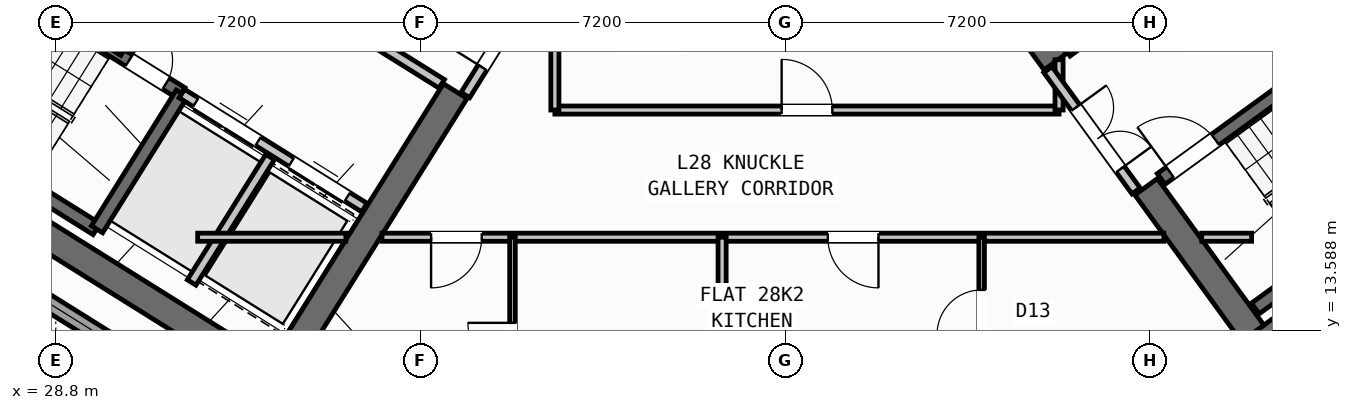
"""IFC4 building model, lengths in metres.
Left out: names, types, materials, properties, quantities, classifications, styles, units other than length and angle.
Written with IfcOpenShell. Run it as: python <this file> out.ifc"""

import sys

from ifc_helpers import new_model, si_unit, direction, frame, frame_2d, origin, place, context, subcontext, project, spatial, rectangle, extrude, source, transform, mapped, element, fill, save


model = new_model("IFC4")
c1 = context("Model", 3, precision=1e-05, world=origin(), true_north=direction((0.0, 1.0)))
c2 = subcontext(c1, "Body", "Model", "MODEL_VIEW")
j1 = project(units=[si_unit("LENGTHUNIT", "METRE"), si_unit("PLANEANGLEUNIT", "RADIAN")], contexts=[c1])
p1 = place(None, origin())
s1 = spatial("IfcSite", under=j1, at=p1, CompositionType="ELEMENT")
p2 = place(p1, origin())
s2 = spatial("IfcBuilding", under=s1, at=p2, CompositionType="ELEMENT")
p3 = place(p2, frame((0.0, 0.0, 112.5)))
s3 = spatial("IfcBuildingStorey", under=s2, at=p3, CompositionType="ELEMENT", Elevation=112.5)
p4 = place(p3, frame((33.366, 12.477, 0.0), z_axis=(0.0, 0.0, 1.0), x_axis=(-0.848047359947, 0.529920442413, 0.0)))
e1 = element("IfcWall", 1, at=p4, inside=s3, PredefinedType="SHEAR", context=c2, shape_type="SweptSolid", body=[
    extrude(rectangle(XDim=13.14, YDim=0.55, at=frame_2d((6.57, 0.0))), origin(), (0.0, 0.0, 1.0), 3.35),
])
p5 = place(p3, frame((36.683, 18.304, 0.0), z_axis=(0.0, 0.0, 1.0), x_axis=(-0.529896466841, -0.848062341122, 0.0)))
e2 = element("IfcWall", 2, at=p5, inside=s3, PredefinedType="SHEAR", context=c2, shape_type="SweptSolid", body=[
    extrude(rectangle(XDim=6.425, YDim=0.55, at=frame_2d((3.212, 0.0))), origin(), (0.0, 0.0, 1.0), 3.35),
])
p6 = place(p3, frame((52.359, 13.14, 0.0), z_axis=(0.0, 0.0, 1.0), x_axis=(0.809014896919, 0.587788139183, 0.0)))
e3 = element("IfcWall", 3, at=p6, inside=s3, PredefinedType="SHEAR", context=c2, shape_type="SweptSolid", body=[
    extrude(rectangle(XDim=12.34, YDim=0.55, at=frame_2d((6.17, 0.0))), origin(), (0.0, 0.0, 1.0), 3.35),
])
p7 = place(p3, frame((52.42, 13.524, 0.0), z_axis=(0.0, 0.0, 1.0), x_axis=(-0.587802113096, 0.809004744015, 0.0)))
e4 = element("IfcWall", 4, at=p7, inside=s3, PredefinedType="SHEAR", context=c2, shape_type="SweptSolid", body=[
    extrude(rectangle(XDim=3.575, YDim=0.55, at=frame_2d((1.788, 0.0))), origin(), (0.0, 0.0, 1.0), 3.35),
])
p8 = place(p3, frame((48.526, 18.884, 0.0), z_axis=(0.0, 0.0, 1.0), x_axis=(-0.587764933797, 0.809031756236, 0.0)))
e5 = element("IfcWall", 5, at=p8, inside=s3, PredefinedType="SHEAR", context=c2, shape_type="SweptSolid", body=[
    extrude(rectangle(XDim=6.425, YDim=0.55, at=frame_2d((3.212, 0.0))), origin(), (0.0, 0.0, 1.0), 3.35),
])
p9 = place(p3, frame((31.76, 12.183, 0.0), z_axis=(0.0, 0.0, 1.0), x_axis=(-0.848047074256, 0.529920899612, 0.0)))
e6 = element("IfcWall", 6, at=p9, inside=s3, PredefinedType="STANDARD", context=c2, shape_type="SweptSolid", body=[
    extrude(rectangle(XDim=30.652, YDim=0.32, at=frame_2d((15.326, 0.0))), origin(), (0.0, 0.0, 1.0), 3.35),
])
p10 = place(p9, frame((15.153, 0.0, 0.0)))
e7 = element("IfcOpeningElement", 7, at=p10, cuts=e6, PredefinedType="OPENING", context=c2, shape_type="SweptSolid", body=[
    extrude(rectangle(XDim=1.2, YDim=2.15, at=frame_2d((0.6, 1.075))), frame((0.0, 0.17, 0.0), z_axis=(0.0, -1.0, 0.0), x_axis=(1.0, 0.0, 0.0)), (0.0, 0.0, 1.0), 0.34),
])
p11 = place(p9, frame((2.002, 0.0, 0.8)))
e8 = element("IfcOpeningElement", 8, at=p11, cuts=e6, PredefinedType="OPENING", context=c2, shape_type="SweptSolid", body=[
    extrude(rectangle(XDim=2.1, YDim=1.55, at=frame_2d((1.05, 0.775))), frame((0.0, 0.17, 0.0), z_axis=(0.0, -1.0, 0.0), x_axis=(1.0, 0.0, 0.0)), (0.0, 0.0, 1.0), 0.34),
])
p12 = place(p9, frame((7.206, 0.0, 0.8)))
e9 = element("IfcOpeningElement", 9, at=p12, cuts=e6, PredefinedType="OPENING", context=c2, shape_type="SweptSolid", body=[
    extrude(rectangle(XDim=2.1, YDim=1.55, at=frame_2d((1.05, 0.775))), frame((0.0, 0.17, 0.0), z_axis=(0.0, -1.0, 0.0), x_axis=(1.0, 0.0, 0.0)), (0.0, 0.0, 1.0), 0.34),
])
p13 = place(p9, frame((12.648, 0.0, 1.0)))
e10 = element("IfcOpeningElement", 10, at=p13, cuts=e6, PredefinedType="OPENING", context=c2, shape_type="SweptSolid", body=[
    extrude(rectangle(XDim=0.9, YDim=1.25, at=frame_2d((0.45, 0.625))), frame((0.0, 0.17, 0.0), z_axis=(0.0, -1.0, 0.0), x_axis=(1.0, 0.0, 0.0)), (0.0, 0.0, 1.0), 0.34),
])
p14 = place(p9, frame((19.59, 0.0, 0.95)))
e11 = element("IfcOpeningElement", 11, at=p14, cuts=e6, PredefinedType="OPENING", context=c2, shape_type="SweptSolid", body=[
    extrude(rectangle(XDim=1.2, YDim=1.4, at=frame_2d((0.6, 0.7))), frame((0.0, 0.17, 0.0), z_axis=(0.0, -1.0, 0.0), x_axis=(1.0, 0.0, 0.0)), (0.0, 0.0, 1.0), 0.34),
])
p15 = place(p9, frame((25.966, 0.0, 1.0)))
e12 = element("IfcOpeningElement", 12, at=p15, cuts=e6, PredefinedType="OPENING", context=c2, shape_type="SweptSolid", body=[
    extrude(rectangle(XDim=0.9, YDim=1.25, at=frame_2d((0.45, 0.625))), frame((0.0, 0.17, 0.0), z_axis=(0.0, -1.0, 0.0), x_axis=(1.0, 0.0, 0.0)), (0.0, 0.0, 1.0), 0.34),
])
p16 = place(p9, frame((28.871, 0.0, 1.0)))
e13 = element("IfcOpeningElement", 13, at=p16, cuts=e6, PredefinedType="OPENING", context=c2, shape_type="SweptSolid", body=[
    extrude(rectangle(XDim=0.9, YDim=1.25, at=frame_2d((0.45, 0.625))), frame((0.0, 0.17, 0.0), z_axis=(0.0, -1.0, 0.0), x_axis=(1.0, 0.0, 0.0)), (0.0, 0.0, 1.0), 0.34),
])
p17 = place(p3, frame((29.605, 15.581, 0.0), z_axis=(0.0, 0.0, 1.0), x_axis=(-0.848036911448, 0.529937163087, 0.0)))
e14 = element("IfcWall", 14, at=p17, inside=s3, PredefinedType="SHEAR", context=c2, shape_type="SweptSolid", body=[
    extrude(rectangle(XDim=7.46, YDim=0.26, at=frame_2d((3.73, 0.0))), origin(), (0.0, 0.0, 1.0), 3.35),
])
p18 = place(p3, frame((31.28, 18.261, 0.0), z_axis=(0.0, 0.0, 1.0), x_axis=(-0.848051618787, 0.529913626805, 0.0)))
e15 = element("IfcWall", 15, at=p18, inside=s3, PredefinedType="SHEAR", context=c2, shape_type="SweptSolid", body=[
    extrude(rectangle(XDim=7.46, YDim=0.26, at=frame_2d((3.73, 0.0))), origin(), (0.0, 0.0, 1.0), 3.35),
])
p19 = place(p18, frame((0.36, 0.0, 0.0)))
e16 = element("IfcOpeningElement", 16, at=p19, cuts=e15, PredefinedType="OPENING", context=c2, shape_type="SweptSolid", body=[
    extrude(rectangle(XDim=0.86, YDim=2.05, at=frame_2d((0.43, 1.025))), frame((0.0, 0.14, 0.0), z_axis=(0.0, -1.0, 0.0), x_axis=(1.0, 0.0, 0.0)), (0.0, 0.0, 1.0), 0.28),
])
p20 = place(p3, frame((31.288, 18.256, 0.0), z_axis=(0.0, 0.0, 1.0), x_axis=(-0.529943379326, -0.848033026897, 0.0)))
e17 = element("IfcWall", 17, at=p20, inside=s3, PredefinedType="SHEAR", context=c2, shape_type="SweptSolid", body=[
    extrude(rectangle(XDim=3.16, YDim=0.26, at=frame_2d((1.58, 0.0))), origin(), (0.0, 0.0, 1.0), 3.35),
])
p21 = place(p3, frame((34.891, 16.005, 0.0), z_axis=(0.0, 0.0, 1.0), x_axis=(-0.848062873452, 0.529895614884, 0.0)))
e18 = element("IfcWall", 18, at=p21, inside=s3, PredefinedType="STANDARD", context=c2, shape_type="SweptSolid", body=[
    extrude(rectangle(XDim=4.248, YDim=0.2, at=frame_2d((2.124, 0.0))), origin(), (0.0, 0.0, 1.0), 3.34),
])
p22 = place(p21, frame((0.398, 0.0, 0.0)))
e19 = element("IfcOpeningElement", 19, at=p22, cuts=e18, PredefinedType="OPENING", context=c2, shape_type="SweptSolid", body=[
    extrude(rectangle(XDim=1.3, YDim=2.2, at=frame_2d((0.65, 1.1))), frame((0.0, 0.11, 0.0), z_axis=(0.0, -1.0, 0.0), x_axis=(1.0, 0.0, 0.0)), (0.0, 0.0, 1.0), 0.22),
])
p23 = place(p21, frame((2.473, 0.0, 0.0)))
e20 = element("IfcOpeningElement", 20, at=p23, cuts=e18, PredefinedType="OPENING", context=c2, shape_type="SweptSolid", body=[
    extrude(rectangle(XDim=1.45, YDim=2.25, at=frame_2d((0.725, 1.125))), frame((0.0, 0.11, 0.0), z_axis=(0.0, -1.0, 0.0), x_axis=(1.0, 0.0, 0.0)), (0.0, 0.0, 1.0), 0.22),
])
p24 = place(p3, frame((36.417, 18.447, 0.0), z_axis=(0.0, 0.0, 1.0), x_axis=(-0.848064879198, 0.529892404805, 0.0)))
e21 = element("IfcWall", 21, at=p24, inside=s3, PredefinedType="STANDARD", context=c2, shape_type="SweptSolid", body=[
    extrude(rectangle(XDim=5.768, YDim=0.2, at=frame_2d((2.884, 0.0))), origin(), (0.0, 0.0, 1.0), 3.34),
])
p25 = place(p24, frame((2.548, 0.0, 0.0)))
e22 = element("IfcOpeningElement", 22, at=p25, cuts=e21, PredefinedType="OPENING", context=c2, shape_type="SweptSolid", body=[
    extrude(rectangle(XDim=1.15, YDim=2.1, at=frame_2d((0.575, 1.05))), frame((0.0, 0.11, 0.0), z_axis=(0.0, -1.0, 0.0), x_axis=(1.0, 0.0, 0.0)), (0.0, 0.0, 1.0), 0.22),
])
p26 = place(p3, frame((33.029, 17.003, 0.0), z_axis=(0.0, 0.0, 1.0), x_axis=(-0.529916267533, -0.848049968695, 0.0)))
e23 = element("IfcWall", 23, at=p26, inside=s3, PredefinedType="STANDARD", context=c2, shape_type="SweptSolid", body=[
    extrude(rectangle(XDim=2.92, YDim=0.2, at=frame_2d((1.46, 0.0))), origin(), (0.0, 0.0, 1.0), 3.34),
])
p27 = place(p3, frame((31.525, 21.504, 0.0), z_axis=(0.0, 0.0, 1.0), x_axis=(-0.529907497854, -0.848055448493, 0.0)))
e24 = element("IfcWall", 24, at=p27, inside=s3, PredefinedType="STANDARD", context=c2, shape_type="SweptSolid", body=[
    extrude(rectangle(XDim=2.88, YDim=0.2, at=frame_2d((1.44, 0.0))), origin(), (0.0, 0.0, 1.0), 3.34),
])
p28 = place(p3, frame((52.472, 14.013, 0.0), z_axis=(0.0, 0.0, 1.0), x_axis=(0.809028366311, 0.587769599847, 0.0)))
e25 = element("IfcWall", 25, at=p28, inside=s3, PredefinedType="SHEAR", context=c2, shape_type="SweptSolid", body=[
    extrude(rectangle(XDim=7.33, YDim=0.26, at=frame_2d((3.665, 0.0))), origin(), (0.0, 0.0, 1.0), 3.35),
])
p29 = place(p3, frame((50.615, 16.57, 0.0), z_axis=(0.0, 0.0, 1.0), x_axis=(0.809028366311, 0.587769599847, 0.0)))
e26 = element("IfcWall", 26, at=p29, inside=s3, PredefinedType="SHEAR", context=c2, shape_type="SweptSolid", body=[
    extrude(rectangle(XDim=7.33, YDim=0.26, at=frame_2d((3.665, 0.0))), origin(), (0.0, 0.0, 1.0), 3.35),
])
p30 = place(p29, frame((0.22, 0.0, 0.0)))
e27 = element("IfcOpeningElement", 27, at=p30, cuts=e26, PredefinedType="OPENING", context=c2, shape_type="SweptSolid", body=[
    extrude(rectangle(XDim=1.1, YDim=2.1, at=frame_2d((0.55, 1.05))), frame((0.0, 0.14, 0.0), z_axis=(0.0, -1.0, 0.0), x_axis=(1.0, 0.0, 0.0)), (0.0, 0.0, 1.0), 0.28),
])
p31 = place(p3, frame((48.758, 19.077, 0.0), z_axis=(0.0, 0.0, 1.0), x_axis=(0.809005065155, 0.587801671104, 0.0)))
e28 = element("IfcWall", 28, at=p31, inside=s3, PredefinedType="STANDARD", context=c2, shape_type="SweptSolid", body=[
    extrude(rectangle(XDim=5.768, YDim=0.2, at=frame_2d((2.884, 0.0))), origin(), (0.0, 0.0, 1.0), 3.34),
])
p32 = place(p31, frame((2.548, 0.0, 0.0)))
e29 = element("IfcOpeningElement", 29, at=p32, cuts=e28, PredefinedType="OPENING", context=c2, shape_type="SweptSolid", body=[
    extrude(rectangle(XDim=1.15, YDim=2.1, at=frame_2d((0.575, 1.05))), frame((0.0, 0.11, 0.0), z_axis=(0.0, -1.0, 0.0), x_axis=(1.0, 0.0, 0.0)), (0.0, 0.0, 1.0), 0.22),
])
p33 = place(p3, frame((38.451, 20.737, 0.0), z_axis=(0.0, 0.0, 1.0), x_axis=(-0.529924799939, -0.848044637038, 0.0)))
e30 = element("IfcWall", 30, at=p33, inside=s3, PredefinedType="STANDARD", context=c2, shape_type="SweptSolid", body=[
    extrude(rectangle(XDim=2.96, YDim=0.2, at=frame_2d((1.48, 0.0))), origin(), (0.0, 0.0, 1.0), 3.34),
])
p34 = place(p33, frame((1.46, 0.0, 0.0)))
e31 = element("IfcOpeningElement", 31, at=p34, cuts=e30, PredefinedType="OPENING", context=c2, shape_type="SweptSolid", body=[
    extrude(rectangle(XDim=0.86, YDim=2.05, at=frame_2d((0.43, 1.025))), frame((0.0, 0.11, 0.0), z_axis=(0.0, -1.0, 0.0), x_axis=(1.0, 0.0, 0.0)), (0.0, 0.0, 1.0), 0.22),
])
p35 = place(p3, frame((31.6, 15.42, 0.0), z_axis=(0.0, 0.0, 1.0), x_axis=(1.0, 0.0, 0.0)))
e32 = element("IfcWall", 32, at=p35, inside=s3, PredefinedType="PARTITIONING", context=c2, shape_type="SweptSolid", body=[
    extrude(rectangle(XDim=2.925, YDim=0.16, at=frame_2d((1.462, 0.0))), origin(), (0.0, 0.0, 1.0), 3.34),
])
p36 = place(p3, frame((35.237, 15.42, 0.0), z_axis=(0.0, 0.0, 1.0), x_axis=(1.0, 0.0, 0.0)))
e33 = element("IfcWall", 33, at=p36, inside=s3, PredefinedType="PARTITIONING", context=c2, shape_type="SweptSolid", body=[
    extrude(rectangle(XDim=15.432, YDim=0.16, at=frame_2d((7.716, 0.0))), origin(), (0.0, 0.0, 1.0), 3.34),
])
p37 = place(p36, frame((0.969, 0.0, 0.0)))
e34 = element("IfcOpeningElement", 34, at=p37, cuts=e33, PredefinedType="OPENING", context=c2, shape_type="SweptSolid", body=[
    extrude(rectangle(XDim=1.0, YDim=2.1, at=frame_2d((0.5, 1.05))), frame((0.0, 0.09, 0.0), z_axis=(0.0, -1.0, 0.0), x_axis=(1.0, 0.0, 0.0)), (0.0, 0.0, 1.0), 0.18),
])
p38 = place(p36, frame((8.799, 0.0, 0.0)))
e35 = element("IfcOpeningElement", 35, at=p38, cuts=e33, PredefinedType="OPENING", context=c2, shape_type="SweptSolid", body=[
    extrude(rectangle(XDim=1.0, YDim=2.1, at=frame_2d((0.5, 1.05))), frame((0.0, 0.09, 0.0), z_axis=(0.0, -1.0, 0.0), x_axis=(1.0, 0.0, 0.0)), (0.0, 0.0, 1.0), 0.18),
])
p39 = place(p3, frame((51.416, 15.42, 0.0), z_axis=(0.0, 0.0, 1.0), x_axis=(1.0, 0.0, 0.0)))
e36 = element("IfcWall", 36, at=p39, inside=s3, PredefinedType="PARTITIONING", context=c2, shape_type="SweptSolid", body=[
    extrude(rectangle(XDim=0.984, YDim=0.16, at=frame_2d((0.492, 0.0))), origin(), (0.0, 0.0, 1.0), 3.34),
])
p40 = place(p3, frame((38.65, 17.93, 0.0), z_axis=(0.0, 0.0, 1.0), x_axis=(1.0, 0.0, 0.0)))
e37 = element("IfcWall", 37, at=p40, inside=s3, PredefinedType="PARTITIONING", context=c2, shape_type="SweptSolid", body=[
    extrude(rectangle(XDim=9.95, YDim=0.16, at=frame_2d((4.975, 0.0))), origin(), (0.0, 0.0, 1.0), 3.34),
])
p41 = place(p40, frame((4.475, 0.0, 0.0)))
e38 = element("IfcOpeningElement", 38, at=p41, cuts=e37, PredefinedType="OPENING", context=c2, shape_type="SweptSolid", body=[
    extrude(rectangle(XDim=1.0, YDim=2.1, at=frame_2d((0.5, 1.05))), frame((0.0, 0.09, 0.0), z_axis=(0.0, -1.0, 0.0), x_axis=(1.0, 0.0, 0.0)), (0.0, 0.0, 1.0), 0.18),
])
p42 = place(p3, frame((38.65, 17.93, 0.0), z_axis=(0.0, 0.0, 1.0), x_axis=(0.0, 1.0, 0.0)))
e39 = element("IfcWall", 39, at=p42, inside=s3, PredefinedType="PARTITIONING", context=c2, shape_type="SweptSolid", body=[
    extrude(rectangle(XDim=2.951, YDim=0.16, at=frame_2d((1.476, 0.0))), origin(), (0.0, 0.0, 1.0), 3.34),
])
p43 = place(p3, frame((48.6, 17.93, 0.0), z_axis=(0.0, 0.0, 1.0), x_axis=(0.0, 1.0, 0.0)))
e40 = element("IfcWall", 40, at=p43, inside=s3, PredefinedType="PARTITIONING", context=c2, shape_type="SweptSolid", body=[
    extrude(rectangle(XDim=0.993, YDim=0.16, at=frame_2d((0.496, 0.0))), origin(), (0.0, 0.0, 1.0), 3.34),
])
p44 = place(p3, frame((50.119, 16.333, 0.0), z_axis=(0.0, 0.0, 1.0), x_axis=(-0.587749856981, 0.809042709391, 0.0)))
e41 = element("IfcWall", 41, at=p44, inside=s3, PredefinedType="STANDARD", context=c2, shape_type="SweptSolid", body=[
    extrude(rectangle(XDim=2.96, YDim=0.2, at=frame_2d((1.48, 0.0))), origin(), (0.0, 0.0, 1.0), 3.34),
])
p45 = place(p44, frame((0.53, 0.0, 0.0)))
e42 = element("IfcOpeningElement", 42, at=p45, cuts=e41, PredefinedType="OPENING", context=c2, shape_type="SweptSolid", body=[
    extrude(rectangle(XDim=1.5, YDim=2.15, at=frame_2d((0.75, 1.075))), frame((0.0, 0.11, 0.0), z_axis=(0.0, -1.0, 0.0), x_axis=(1.0, 0.0, 0.0)), (0.0, 0.0, 1.0), 0.22),
])
p46 = place(p3, frame((41.95, 1.96, 0.0), z_axis=(0.0, 0.0, 1.0), x_axis=(0.0, 1.0, 0.0)))
e43 = element("IfcWall", 43, at=p46, inside=s3, PredefinedType="PARTITIONING", context=c2, shape_type="SweptSolid", body=[
    extrude(rectangle(XDim=13.46, YDim=0.16, at=frame_2d((6.73, 0.0))), origin(), (0.0, 0.0, 1.0), 3.34),
])
p47 = place(p3, frame((37.813, 1.96, 0.0), z_axis=(0.0, 0.0, 1.0), x_axis=(0.0, 1.0, 0.0)))
e44 = element("IfcWall", 44, at=p47, inside=s3, PredefinedType="PARTITIONING", context=c2, shape_type="SweptSolid", body=[
    extrude(rectangle(XDim=13.46, YDim=0.11, at=frame_2d((6.73, 0.0))), origin(), (0.0, 0.0, 1.0), 3.34),
])
p48 = place(p47, frame((5.5, 0.0, 0.0)))
e45 = element("IfcOpeningElement", 45, at=p48, cuts=e44, PredefinedType="OPENING", context=c2, shape_type="SweptSolid", body=[
    extrude(rectangle(XDim=0.92, YDim=2.08, at=frame_2d((0.46, 1.04))), frame((0.0, 0.065, 0.0), z_axis=(0.0, -1.0, 0.0), x_axis=(1.0, 0.0, 0.0)), (0.0, 0.0, 1.0), 0.13),
])
p49 = place(p47, frame((10.89, 0.0, 0.0)))
e46 = element("IfcOpeningElement", 46, at=p49, cuts=e44, PredefinedType="OPENING", context=c2, shape_type="SweptSolid", body=[
    extrude(rectangle(XDim=0.88, YDim=2.08, at=frame_2d((0.44, 1.04))), frame((0.0, 0.065, 0.0), z_axis=(0.0, -1.0, 0.0), x_axis=(1.0, 0.0, 0.0)), (0.0, 0.0, 1.0), 0.13),
])
p50 = place(p3, frame((47.072, 1.96, 0.0), z_axis=(0.0, 0.0, 1.0), x_axis=(0.0, 1.0, 0.0)))
e47 = element("IfcWall", 47, at=p50, inside=s3, PredefinedType="PARTITIONING", context=c2, shape_type="SweptSolid", body=[
    extrude(rectangle(XDim=13.46, YDim=0.11, at=frame_2d((6.73, 0.0))), origin(), (0.0, 0.0, 1.0), 3.34),
])
p51 = place(p50, frame((6.6, 0.0, 0.0)))
e48 = element("IfcOpeningElement", 48, at=p51, cuts=e47, PredefinedType="OPENING", context=c2, shape_type="SweptSolid", body=[
    extrude(rectangle(XDim=0.92, YDim=2.08, at=frame_2d((0.46, 1.04))), frame((0.0, 0.065, 0.0), z_axis=(0.0, -1.0, 0.0), x_axis=(1.0, 0.0, 0.0)), (0.0, 0.0, 1.0), 0.13),
])
p52 = place(p50, frame((11.54, 0.0, 0.0)))
e49 = element("IfcOpeningElement", 49, at=p52, cuts=e47, PredefinedType="OPENING", context=c2, shape_type="SweptSolid", body=[
    extrude(rectangle(XDim=0.88, YDim=2.08, at=frame_2d((0.44, 1.04))), frame((0.0, 0.065, 0.0), z_axis=(0.0, -1.0, 0.0), x_axis=(1.0, 0.0, 0.0)), (0.0, 0.0, 1.0), 0.13),
])
m1 = source(origin(), c2, "Body", "SweptSolid", [
    extrude(rectangle(XDim=2.1, YDim=1.55, at=frame_2d((1.05, 0.775))), frame((0.0, 0.03, 0.0), z_axis=(0.0, -1.0, 0.0), x_axis=(1.0, 0.0, 0.0)), (0.0, 0.0, 1.0), 0.06),
])
p53 = place(p11, origin())
e50 = element("IfcWindow", 50, at=p53, inside=s3, PartitioningType="SINGLE_PANEL", PredefinedType="WINDOW", context=c2, shape_type="MappedRepresentation", body=[
    mapped(m1, transform((0.0, 0.0, 0.0), scale=1.0)),
])
fill(e8, e50)
m2 = source(origin(), c2, "Body", "SweptSolid", [
    extrude(rectangle(XDim=0.86, YDim=2.05, at=frame_2d((0.43, 1.025))), frame((0.0, 0.025, 0.0), z_axis=(0.0, -1.0, 0.0), x_axis=(1.0, 0.0, 0.0)), (0.0, 0.0, 1.0), 0.05),
])
p54 = place(p19, frame((0.86, 0.0, 0.0), z_axis=(0.0, 0.0, 1.0), x_axis=(-1.0, 0.0, 0.0)))
e51 = element("IfcDoor", 51, at=p54, inside=s3, OperationType="SINGLE_SWING_LEFT", PredefinedType="DOOR", context=c2, shape_type="MappedRepresentation", body=[
    mapped(m2, transform((0.0, 0.0, 0.0), scale=1.0)),
])
fill(e16, e51)
m3 = source(origin(), c2, "Body", "SweptSolid", [
    extrude(rectangle(XDim=1.3, YDim=2.2, at=frame_2d((0.65, 1.1))), frame((0.0, 0.025, 0.0), z_axis=(0.0, -1.0, 0.0), x_axis=(1.0, 0.0, 0.0)), (0.0, 0.0, 1.0), 0.05),
])
p55 = place(p22, origin())
e52 = element("IfcDoor", 52, at=p55, inside=s3, OperationType="DOUBLE_DOOR_SLIDING", PredefinedType="DOOR", context=c2, shape_type="MappedRepresentation", body=[
    mapped(m3, transform((0.0, 0.0, 0.0), scale=1.0)),
])
fill(e19, e52)
m4 = source(origin(), c2, "Body", "SweptSolid", [
    extrude(rectangle(XDim=1.45, YDim=2.25, at=frame_2d((0.725, 1.125))), frame((0.0, 0.025, 0.0), z_axis=(0.0, -1.0, 0.0), x_axis=(1.0, 0.0, 0.0)), (0.0, 0.0, 1.0), 0.05),
])
p56 = place(p23, origin())
e53 = element("IfcDoor", 53, at=p56, inside=s3, OperationType="DOUBLE_DOOR_SLIDING", PredefinedType="DOOR", context=c2, shape_type="MappedRepresentation", body=[
    mapped(m4, transform((0.0, 0.0, 0.0), scale=1.0)),
])
fill(e20, e53)
m5 = source(origin(), c2, "Body", "SweptSolid", [
    extrude(rectangle(XDim=1.1, YDim=2.1, at=frame_2d((0.55, 1.05))), frame((0.0, 0.025, 0.0), z_axis=(0.0, -1.0, 0.0), x_axis=(1.0, 0.0, 0.0)), (0.0, 0.0, 1.0), 0.05),
])
p57 = place(p30, origin())
e54 = element("IfcDoor", 54, at=p57, inside=s3, OperationType="SINGLE_SWING_LEFT", PredefinedType="DOOR", context=c2, shape_type="MappedRepresentation", body=[
    mapped(m5, transform((0.0, 0.0, 0.0), scale=1.0)),
])
fill(e27, e54)
m6 = source(origin(), c2, "Body", "SweptSolid", [
    extrude(rectangle(XDim=1.0, YDim=2.1, at=frame_2d((0.5, 1.05))), frame((0.0, 0.025, 0.0), z_axis=(0.0, -1.0, 0.0), x_axis=(1.0, 0.0, 0.0)), (0.0, 0.0, 1.0), 0.05),
])
p58 = place(p41, origin())
e55 = element("IfcDoor", 55, at=p58, inside=s3, OperationType="SINGLE_SWING_LEFT", PredefinedType="DOOR", context=c2, shape_type="MappedRepresentation", body=[
    mapped(m6, transform((0.0, 0.0, 0.0), scale=1.0)),
])
fill(e38, e55)
p59 = place(p34, frame((0.86, 0.0, 0.0), z_axis=(0.0, 0.0, 1.0), x_axis=(-1.0, 0.0, 0.0)))
e56 = element("IfcDoor", 56, at=p59, inside=s3, OperationType="SINGLE_SWING_LEFT", PredefinedType="DOOR", context=c2, shape_type="MappedRepresentation", body=[
    mapped(m2, transform((0.0, 0.0, 0.0), scale=1.0)),
])
fill(e31, e56)
m7 = source(origin(), c2, "Body", "SweptSolid", [
    extrude(rectangle(XDim=1.5, YDim=2.15, at=frame_2d((0.75, 1.075))), frame((0.0, 0.025, 0.0), z_axis=(0.0, -1.0, 0.0), x_axis=(1.0, 0.0, 0.0)), (0.0, 0.0, 1.0), 0.05),
])
p60 = place(p45, frame((1.5, 0.0, 0.0), z_axis=(0.0, 0.0, 1.0), x_axis=(-1.0, 0.0, 0.0)))
e57 = element("IfcDoor", 57, at=p60, inside=s3, OperationType="DOUBLE_DOOR_SINGLE_SWING", PredefinedType="DOOR", context=c2, shape_type="MappedRepresentation", body=[
    mapped(m7, transform((0.0, 0.0, 0.0), scale=1.0)),
])
fill(e42, e57)
p61 = place(p37, frame((1.0, 0.0, 0.0), z_axis=(0.0, 0.0, 1.0), x_axis=(-1.0, 0.0, 0.0)))
e58 = element("IfcDoor", 58, at=p61, inside=s3, OperationType="SINGLE_SWING_RIGHT", PredefinedType="DOOR", context=c2, shape_type="MappedRepresentation", body=[
    mapped(m6, transform((0.0, 0.0, 0.0), scale=1.0)),
])
fill(e34, e58)
m8 = source(origin(), c2, "Body", "SweptSolid", [
    extrude(rectangle(XDim=0.88, YDim=2.08, at=frame_2d((0.44, 1.04))), frame((0.0, 0.025, 0.0), z_axis=(0.0, -1.0, 0.0), x_axis=(1.0, 0.0, 0.0)), (0.0, 0.0, 1.0), 0.05),
])
p62 = place(p49, origin())
e59 = element("IfcDoor", 59, at=p62, inside=s3, OperationType="SINGLE_SWING_RIGHT", PredefinedType="DOOR", context=c2, shape_type="MappedRepresentation", body=[
    mapped(m8, transform((0.0, 0.0, 0.0), scale=1.0)),
])
fill(e46, e59)
p63 = place(p38, frame((1.0, 0.0, 0.0), z_axis=(0.0, 0.0, 1.0), x_axis=(-1.0, 0.0, 0.0)))
e60 = element("IfcDoor", 60, at=p63, inside=s3, OperationType="SINGLE_SWING_LEFT", PredefinedType="DOOR", context=c2, shape_type="MappedRepresentation", body=[
    mapped(m6, transform((0.0, 0.0, 0.0), scale=1.0)),
])
fill(e35, e60)
p64 = place(p52, origin())
e61 = element("IfcDoor", 61, at=p64, inside=s3, OperationType="SINGLE_SWING_LEFT", PredefinedType="DOOR", context=c2, shape_type="MappedRepresentation", body=[
    mapped(m8, transform((0.0, 0.0, 0.0), scale=1.0)),
])
fill(e49, e61)
save(model, sys.argv[1])
